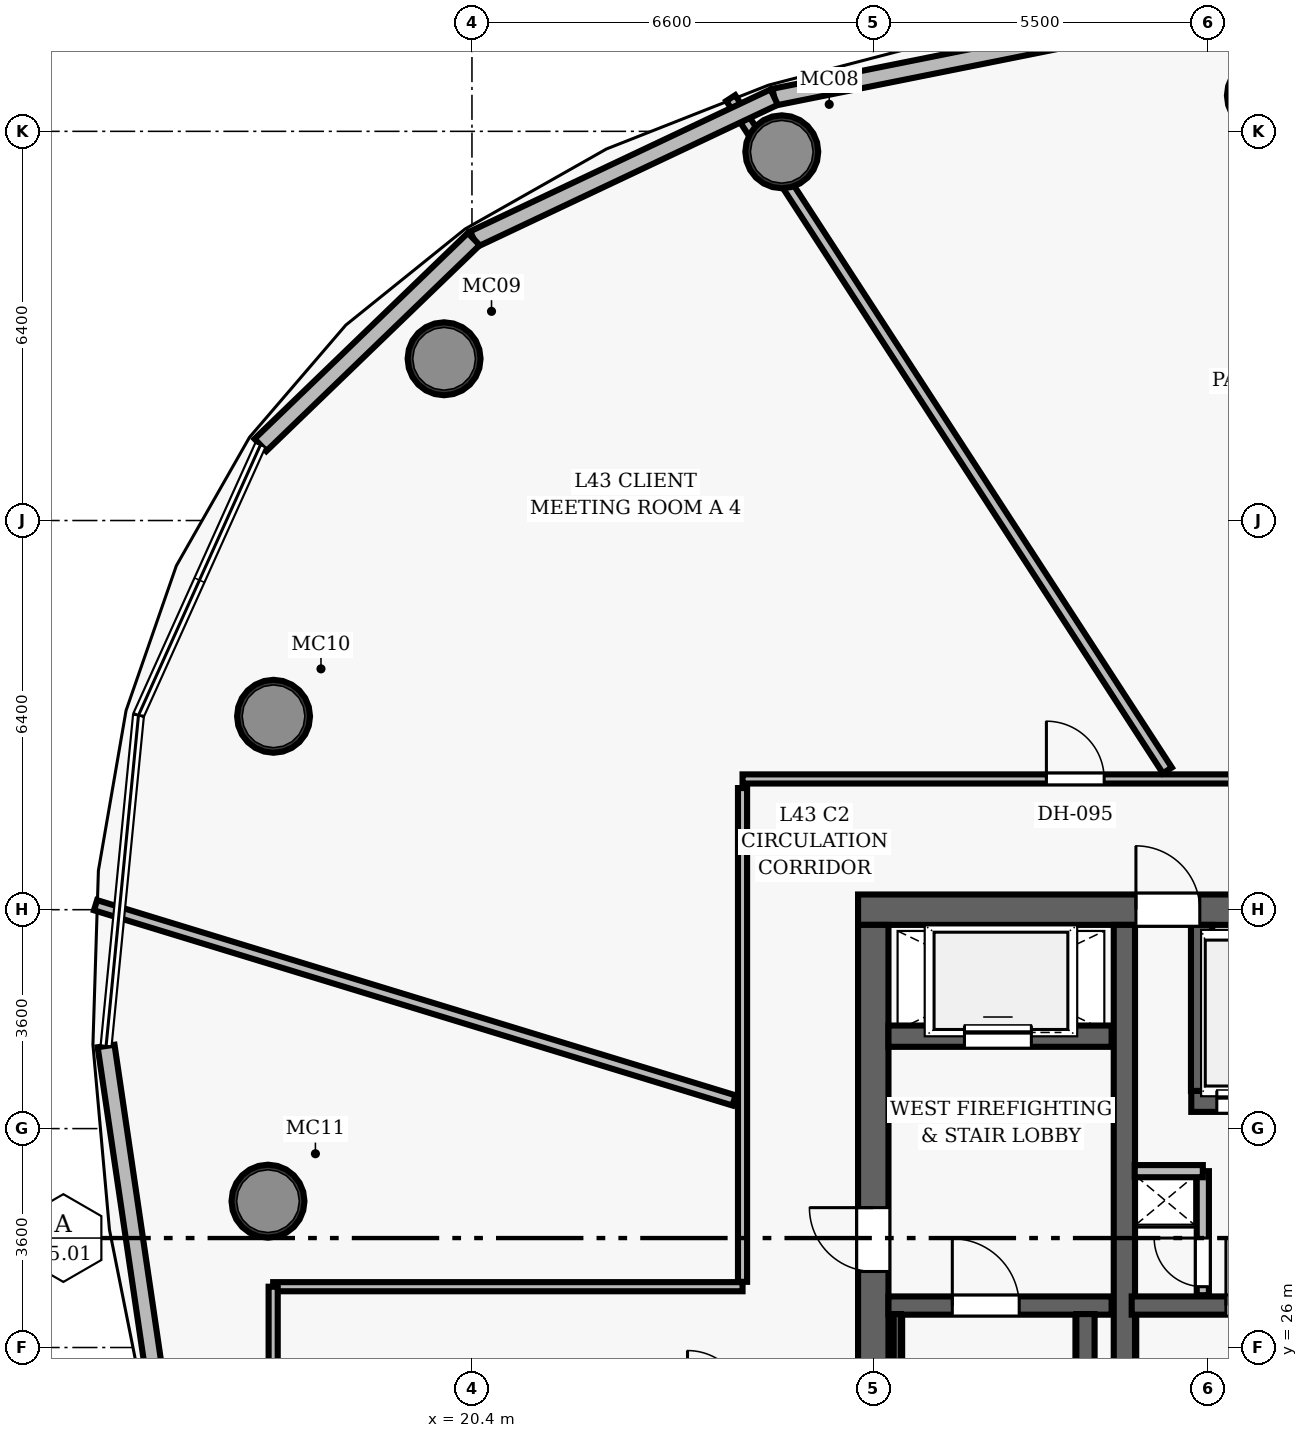
"""IFC4 building model, lengths in metres.
Left out: names, types, materials, properties, quantities, classifications, styles, units other than length and angle.
Written with IfcOpenShell. Run it as: python <this file> out.ifc"""

import sys

from ifc_helpers import new_model, si_unit, direction, frame, frame_2d, origin, origin_2d, place, context, subcontext, project, spatial, rectangle, hollow_circle, extrude, element, fill, save


model = new_model("IFC4")
c1 = context("Model", 3, precision=1e-05, world=origin(), true_north=direction((0.0, 1.0)))
c2 = subcontext(c1, "Body", "Model", "MODEL_VIEW")
j1 = project(units=[si_unit("LENGTHUNIT", "METRE"), si_unit("PLANEANGLEUNIT", "RADIAN")], contexts=[c1])
p1 = place(None, origin())
s1 = spatial("IfcSite", under=j1, at=p1, CompositionType="ELEMENT")
p2 = place(p1, origin())
s2 = spatial("IfcBuilding", under=s1, at=p2, CompositionType="ELEMENT")
p3 = place(p2, frame((0.0, 0.0, 171.2)))
s3 = spatial("IfcBuildingStorey", under=s2, at=p3, CompositionType="ELEMENT", Elevation=171.2)
p4 = place(p3, frame((26.75, 33.2, 0.0), z_axis=(0.0, 0.0, 1.0), x_axis=(1.0, 0.0, 0.0)))
e1 = element("IfcWall", 1, at=p4, inside=s3, PredefinedType="SHEAR", context=c2, shape_type="SweptSolid", body=[
    extrude(rectangle(XDim=22.5, YDim=0.5, at=frame_2d((11.25, 0.0))), origin(), (0.0, 0.0, 1.0), 3.85),
])
p5 = place(p4, frame((4.57, 0.0, 0.0)))
e2 = element("IfcOpeningElement", 2, at=p5, cuts=e1, PredefinedType="OPENING", context=c2, shape_type="SweptSolid", body=[
    extrude(rectangle(XDim=1.05, YDim=2.15, at=frame_2d((0.525, 1.075))), frame((0.0, 0.26, 0.0), z_axis=(0.0, -1.0, 0.0), x_axis=(1.0, 0.0, 0.0)), (0.0, 0.0, 1.0), 0.52),
])
p6 = place(p4, frame((14.47, 0.0, 0.0)))
e3 = element("IfcOpeningElement", 3, at=p6, cuts=e1, PredefinedType="OPENING", context=c2, shape_type="SweptSolid", body=[
    extrude(rectangle(XDim=1.05, YDim=2.15, at=frame_2d((0.525, 1.075))), frame((0.0, 0.26, 0.0), z_axis=(0.0, -1.0, 0.0), x_axis=(1.0, 0.0, 0.0)), (0.0, 0.0, 1.0), 0.52),
])
p7 = place(p3, frame((27.0, 19.05, 0.0), z_axis=(0.0, 0.0, 1.0), x_axis=(0.0, 1.0, 0.0)))
e4 = element("IfcWall", 4, at=p7, inside=s3, PredefinedType="SHEAR", context=c2, shape_type="SweptSolid", body=[
    extrude(rectangle(XDim=13.9, YDim=0.5, at=frame_2d((6.95, 0.0))), origin(), (0.0, 0.0, 1.0), 3.85),
])
p8 = place(p7, frame((8.2, 0.0, 0.0)))
e5 = element("IfcOpeningElement", 5, at=p8, cuts=e4, PredefinedType="OPENING", context=c2, shape_type="SweptSolid", body=[
    extrude(rectangle(XDim=1.05, YDim=2.15, at=frame_2d((0.525, 1.075))), frame((0.0, 0.26, 0.0), z_axis=(0.0, -1.0, 0.0), x_axis=(1.0, 0.0, 0.0)), (0.0, 0.0, 1.0), 0.52),
])
p9 = place(p3, frame((31.13, 19.05, 0.0), z_axis=(0.0, 0.0, 1.0), x_axis=(0.0, 1.0, 0.0)))
e6 = element("IfcWall", 6, at=p9, inside=s3, PredefinedType="SHEAR", context=c2, shape_type="SweptSolid", body=[
    extrude(rectangle(XDim=13.9, YDim=0.35, at=frame_2d((6.95, 0.0))), origin(), (0.0, 0.0, 1.0), 3.85),
])
for number, where, z_axis, x_axis in (
    (7, (33.416, 46.588, 0.0), (0.0, 0.0, 1.0), (1.0, 0.0, 0.0)),
    (8, (25.496, 45.664, 0.0), (0.0, 0.0, 1.0), (1.0, 0.0, 0.0)),
    (9, (19.942, 42.26, 0.0), (0.0, 0.0, 1.0), (1.0, 0.0, 0.0)),
    (10, (17.137, 36.381, 0.0), (0.0, 0.0, 1.0), (1.0, 0.0, 0.0)),
    (11, (17.045, 28.406, 0.0), (0.0, 0.0, 1.0), (1.0, 0.0, 0.0)),
):
    element("IfcColumn", number, at=place(p3, frame(where, z_axis=z_axis, x_axis=x_axis)), inside=s3, PredefinedType="COLUMN", context=c2, shape_type="SweptSolid", body=[
        extrude(hollow_circle(Radius=0.6, WallThickness=0.05, at=origin_2d()), origin(), (0.0, 0.0, 1.0), 3.85),
    ])
p10 = place(p3, frame((27.25, 26.69, 0.0), z_axis=(0.0, 0.0, 1.0), x_axis=(1.0, 0.0, 0.0)))
e12 = element("IfcWall", 12, at=p10, inside=s3, PredefinedType="SHEAR", context=c2, shape_type="SweptSolid", body=[
    extrude(rectangle(XDim=3.67, YDim=0.3, at=frame_2d((1.835, 0.0))), origin(), (0.0, 0.0, 1.0), 3.85),
])
p11 = place(p10, frame((1.05, 0.0, 0.0)))
e13 = element("IfcOpeningElement", 13, at=p11, cuts=e12, PredefinedType="OPENING", context=c2, shape_type="SweptSolid", body=[
    extrude(rectangle(XDim=1.1, YDim=2.15, at=frame_2d((0.55, 1.075))), frame((0.0, 0.16, 0.0), z_axis=(0.0, -1.0, 0.0), x_axis=(1.0, 0.0, 0.0)), (0.0, 0.0, 1.0), 0.32),
])
p12 = place(p3, frame((30.49, 19.05, 0.0), z_axis=(0.0, 0.0, 1.0), x_axis=(0.0, 1.0, 0.0)))
e14 = element("IfcWall", 14, at=p12, inside=s3, PredefinedType="SHEAR", context=c2, shape_type="SweptSolid", body=[
    extrude(rectangle(XDim=7.5, YDim=0.3, at=frame_2d((3.75, 0.0))), origin(), (0.0, 0.0, 1.0), 3.85),
])
p13 = place(p3, frame((27.395, 19.1, 0.0), z_axis=(0.0, 0.0, 1.0), x_axis=(0.0, 1.0, 0.0)))
e15 = element("IfcWall", 15, at=p13, inside=s3, PredefinedType="SHEAR", context=c2, shape_type="SweptSolid", body=[
    extrude(rectangle(XDim=7.45, YDim=0.12, at=frame_2d((3.725, 0.0))), origin(), (0.0, 0.0, 1.0), 3.85),
])
p14 = place(p3, frame((27.25, 31.12, 0.0), z_axis=(0.0, 0.0, 1.0), x_axis=(1.0, 0.0, 0.0)))
e16 = element("IfcWall", 16, at=p14, inside=s3, PredefinedType="SHEAR", context=c2, shape_type="SweptSolid", body=[
    extrude(rectangle(XDim=3.67, YDim=0.35, at=frame_2d((1.835, 0.0))), origin(), (0.0, 0.0, 1.0), 3.035),
])
p15 = place(p14, frame((1.25, 0.0, 0.0)))
e17 = element("IfcOpeningElement", 17, at=p15, cuts=e16, PredefinedType="OPENING", context=c2, shape_type="SweptSolid", body=[
    extrude(rectangle(XDim=1.1, YDim=2.15, at=frame_2d((0.55, 1.075))), frame((0.0, 0.185, 0.0), z_axis=(0.0, -1.0, 0.0), x_axis=(1.0, 0.0, 0.0)), (0.0, 0.0, 1.0), 0.37),
])
p16 = place(p3, frame((31.25, 26.69, 0.0), z_axis=(0.0, 0.0, 1.0), x_axis=(1.0, 0.0, 0.0)))
e18 = element("IfcWall", 18, at=p16, inside=s3, PredefinedType="SHEAR", context=c2, shape_type="SweptSolid", body=[
    extrude(rectangle(XDim=3.56, YDim=0.3, at=frame_2d((1.78, 0.0))), origin(), (0.0, 0.0, 1.0), 3.85),
])
p17 = place(p16, frame((1.55, 0.0, 0.0)))
e19 = element("IfcOpeningElement", 19, at=p17, cuts=e18, PredefinedType="OPENING", context=c2, shape_type="SweptSolid", body=[
    extrude(rectangle(XDim=1.1, YDim=2.15, at=frame_2d((0.55, 1.075))), frame((0.0, 0.16, 0.0), z_axis=(0.0, -1.0, 0.0), x_axis=(1.0, 0.0, 0.0)), (0.0, 0.0, 1.0), 0.32),
])
p18 = place(p3, frame((32.23, 30.05, 0.0), z_axis=(0.0, 0.0, 1.0), x_axis=(1.0, 0.0, 0.0)))
e20 = element("IfcWall", 20, at=p18, inside=s3, PredefinedType="SHEAR", context=c2, shape_type="SweptSolid", body=[
    extrude(rectangle(XDim=2.41, YDim=0.35, at=frame_2d((1.205, 0.0))), origin(), (0.0, 0.0, 1.0), 3.035),
])
p19 = place(p18, frame((0.42, 0.0, 0.0)))
e21 = element("IfcOpeningElement", 21, at=p19, cuts=e20, PredefinedType="OPENING", context=c2, shape_type="SweptSolid", body=[
    extrude(rectangle(XDim=0.8, YDim=2.15, at=frame_2d((0.4, 1.075))), frame((0.0, 0.185, 0.0), z_axis=(0.0, -1.0, 0.0), x_axis=(1.0, 0.0, 0.0)), (0.0, 0.0, 1.0), 0.37),
])
p20 = place(p18, frame((1.42, 0.0, 0.0)))
e22 = element("IfcOpeningElement", 22, at=p20, cuts=e20, PredefinedType="OPENING", context=c2, shape_type="SweptSolid", body=[
    extrude(rectangle(XDim=0.8, YDim=2.15, at=frame_2d((0.4, 1.075))), frame((0.0, 0.185, 0.0), z_axis=(0.0, -1.0, 0.0), x_axis=(1.0, 0.0, 0.0)), (0.0, 0.0, 1.0), 0.37),
])
p21 = place(p3, frame((32.4, 30.22, 0.0), z_axis=(0.0, 0.0, 1.0), x_axis=(0.0, 1.0, 0.0)))
e23 = element("IfcWall", 23, at=p21, inside=s3, PredefinedType="SHEAR", context=c2, shape_type="SweptSolid", body=[
    extrude(rectangle(XDim=2.73, YDim=0.35, at=frame_2d((1.365, 0.0))), origin(), (0.0, 0.0, 1.0), 3.035),
])
p22 = place(p3, frame((32.42, 26.86, 0.0), z_axis=(0.0, 0.0, 1.0), x_axis=(0.0, 1.0, 0.0)))
e24 = element("IfcWall", 24, at=p22, inside=s3, PredefinedType="PARTITIONING", context=c2, shape_type="SweptSolid", body=[
    extrude(rectangle(XDim=2.04, YDim=0.2, at=frame_2d((1.02, 0.0))), origin(), (0.0, 0.0, 1.0), 3.035),
])
p23 = place(p22, frame((0.14, 0.0, 0.0)))
e25 = element("IfcOpeningElement", 25, at=p23, cuts=e24, PredefinedType="OPENING", context=c2, shape_type="SweptSolid", body=[
    extrude(rectangle(XDim=0.8, YDim=2.05, at=frame_2d((0.4, 1.025))), frame((0.0, 0.11, 0.0), z_axis=(0.0, -1.0, 0.0), x_axis=(1.0, 0.0, 0.0)), (0.0, 0.0, 1.0), 0.22),
])
p24 = place(p3, frame((31.3, 28.9, 0.0), z_axis=(0.0, 0.0, 1.0), x_axis=(1.0, 0.0, 0.0)))
e26 = element("IfcWall", 26, at=p24, inside=s3, PredefinedType="PARTITIONING", context=c2, shape_type="SweptSolid", body=[
    extrude(rectangle(XDim=1.12, YDim=0.2, at=frame_2d((0.56, 0.0))), origin(), (0.0, 0.0, 1.0), 3.035),
])
p25 = place(p3, frame((24.85, 35.35, 0.0), z_axis=(0.0, 0.0, 1.0), x_axis=(1.0, 0.0, 0.0)))
e27 = element("IfcWall", 27, at=p25, inside=s3, PredefinedType="PARTITIONING", context=c2, shape_type="SweptSolid", body=[
    extrude(rectangle(XDim=26.0, YDim=0.15, at=frame_2d((13.0, 0.0))), origin(), (0.0, 0.0, 1.0), 3.035),
])
p26 = place(p25, frame((15.674, 0.0, 0.0)))
e28 = element("IfcOpeningElement", 28, at=p26, cuts=e27, PredefinedType="OPENING", context=c2, shape_type="SweptSolid", body=[
    extrude(rectangle(XDim=1.5, YDim=2.2, at=frame_2d((0.75, 1.1))), frame((0.0, 0.085, 0.0), z_axis=(0.0, -1.0, 0.0), x_axis=(1.0, 0.0, 0.0)), (0.0, 0.0, 1.0), 0.17),
])
p27 = place(p25, frame((10.178, 0.0, 0.0)))
e29 = element("IfcOpeningElement", 29, at=p27, cuts=e27, PredefinedType="OPENING", context=c2, shape_type="SweptSolid", body=[
    extrude(rectangle(XDim=0.95, YDim=2.15, at=frame_2d((0.475, 1.075))), frame((0.0, 0.085, 0.0), z_axis=(0.0, -1.0, 0.0), x_axis=(1.0, 0.0, 0.0)), (0.0, 0.0, 1.0), 0.17),
])
p28 = place(p25, frame((4.997, 0.0, 0.0)))
e30 = element("IfcOpeningElement", 30, at=p28, cuts=e27, PredefinedType="OPENING", context=c2, shape_type="SweptSolid", body=[
    extrude(rectangle(XDim=0.95, YDim=2.15, at=frame_2d((0.475, 1.075))), frame((0.0, 0.085, 0.0), z_axis=(0.0, -1.0, 0.0), x_axis=(1.0, 0.0, 0.0)), (0.0, 0.0, 1.0), 0.17),
])
p29 = place(p3, frame((24.85, 27.08, 0.0), z_axis=(0.0, 0.0, 1.0), x_axis=(0.0, 1.0, 0.0)))
e31 = element("IfcWall", 31, at=p29, inside=s3, PredefinedType="PARTITIONING", context=c2, shape_type="SweptSolid", body=[
    extrude(rectangle(XDim=8.12, YDim=0.15, at=frame_2d((4.06, 0.0))), origin(), (0.0, 0.0, 1.0), 3.035),
])
p30 = place(p3, frame((17.131, 27.0, 0.0), z_axis=(0.0, 0.0, 1.0), x_axis=(1.0, 0.0, 0.0)))
e32 = element("IfcWall", 32, at=p30, inside=s3, PredefinedType="PARTITIONING", context=c2, shape_type="SweptSolid", body=[
    extrude(rectangle(XDim=7.719, YDim=0.15, at=frame_2d((3.86, 0.0))), origin(), (0.0, 0.0, 1.0), 3.035),
])
p31 = place(p3, frame((17.131, 25.0, 0.0), z_axis=(0.0, 0.0, 1.0), x_axis=(0.0, 1.0, 0.0)))
e33 = element("IfcWall", 33, at=p31, inside=s3, PredefinedType="PARTITIONING", context=c2, shape_type="SweptSolid", body=[
    extrude(rectangle(XDim=2.0, YDim=0.15, at=frame_2d((1.0, 0.0))), origin(), (0.0, 0.0, 1.0), 3.035),
])
p32 = place(p3, frame((31.837, 35.49, 0.0), z_axis=(0.0, 0.0, 1.0), x_axis=(-0.544634876215, 0.838673268687, 0.0)))
e34 = element("IfcWall", 34, at=p32, inside=s3, PredefinedType="PARTITIONING", context=c2, shape_type="SweptSolid", body=[
    extrude(rectangle(XDim=13.184, YDim=0.175, at=frame_2d((6.592, 0.0))), origin(), (0.0, 0.0, 1.0), 3.035),
])
p33 = place(p3, frame((24.71, 30.063, 0.0), z_axis=(0.0, 0.0, 1.0), x_axis=(-0.956305303445, 0.292369913984, 0.0)))
e35 = element("IfcWall", 35, at=p33, inside=s3, PredefinedType="PARTITIONING", context=c2, shape_type="SweptSolid", body=[
    extrude(rectangle(XDim=10.981, YDim=0.175, at=frame_2d((5.49, 0.0))), origin(), (0.0, 0.0, 1.0), 3.035),
])
p34 = place(p3, frame((25.37, 46.563, 0.0), z_axis=(0.0, 0.0, 1.0), x_axis=(0.980506708693, 0.196485608144, 0.0)))
e36 = element("IfcWall", 36, at=p34, inside=s3, PredefinedType="SOLIDWALL", context=c2, shape_type="SweptSolid", body=[
    extrude(rectangle(XDim=6.226, YDim=0.28, at=frame_2d((3.113, 0.0))), origin(), (0.0, 0.0, 1.0), 3.62),
])
p35 = place(p3, frame((20.43, 44.229, 0.0), z_axis=(0.0, 0.0, 1.0), x_axis=(0.904134088176, 0.427248815794, 0.0)))
e37 = element("IfcWall", 37, at=p35, inside=s3, PredefinedType="SOLIDWALL", context=c2, shape_type="SweptSolid", body=[
    extrude(rectangle(XDim=5.465, YDim=0.28, at=frame_2d((2.732, 0.0))), origin(), (0.0, 0.0, 1.0), 3.62),
])
p36 = place(p3, frame((16.921, 40.842, 0.0), z_axis=(0.0, 0.0, 1.0), x_axis=(0.719536884829, 0.69445422554, 0.0)))
e38 = element("IfcWall", 38, at=p36, inside=s3, PredefinedType="SOLIDWALL", context=c2, shape_type="SweptSolid", body=[
    extrude(rectangle(XDim=4.876, YDim=0.28, at=frame_2d((2.438, 0.0))), origin(), (0.0, 0.0, 1.0), 3.62),
])
p37 = place(p3, frame((15.289, 24.799, 0.0), z_axis=(0.0, 0.0, 1.0), x_axis=(-0.145586553234, 0.989345518774, 0.0)))
e39 = element("IfcWall", 39, at=p37, inside=s3, PredefinedType="SOLIDWALL", context=c2, shape_type="SweptSolid", body=[
    extrude(rectangle(XDim=6.227, YDim=0.28, at=frame_2d((3.113, 0.0))), origin(), (0.0, 0.0, 1.0), 3.62),
])
p38 = place(p11, origin())
e40 = element("IfcDoor", 40, at=p38, inside=s3, OperationType="SINGLE_SWING_LEFT", PredefinedType="DOOR", context=c2, shape_type="SweptSolid", body=[
    extrude(rectangle(XDim=1.1, YDim=2.15, at=frame_2d((0.55, 1.075))), frame((0.0, 0.025, 0.0), z_axis=(0.0, -1.0, 0.0), x_axis=(1.0, 0.0, 0.0)), (0.0, 0.0, 1.0), 0.05),
])
fill(e13, e40)
p39 = place(p8, origin())
e41 = element("IfcDoor", 41, at=p39, inside=s3, OperationType="SINGLE_SWING_RIGHT", PredefinedType="DOOR", context=c2, shape_type="SweptSolid", body=[
    extrude(rectangle(XDim=1.05, YDim=2.15, at=frame_2d((0.525, 1.075))), frame((0.0, 0.025, 0.0), z_axis=(0.0, -1.0, 0.0), x_axis=(1.0, 0.0, 0.0)), (0.0, 0.0, 1.0), 0.05),
])
fill(e5, e41)
p40 = place(p17, origin())
e42 = element("IfcDoor", 42, at=p40, inside=s3, OperationType="SINGLE_SWING_LEFT", PredefinedType="DOOR", context=c2, shape_type="SweptSolid", body=[
    extrude(rectangle(XDim=1.1, YDim=2.15, at=frame_2d((0.55, 1.075))), frame((0.0, 0.025, 0.0), z_axis=(0.0, -1.0, 0.0), x_axis=(1.0, 0.0, 0.0)), (0.0, 0.0, 1.0), 0.05),
])
fill(e19, e42)
p41 = place(p23, origin())
e43 = element("IfcDoor", 43, at=p41, inside=s3, OperationType="SINGLE_SWING_RIGHT", PredefinedType="DOOR", context=c2, shape_type="SweptSolid", body=[
    extrude(rectangle(XDim=0.8, YDim=2.05, at=frame_2d((0.4, 1.025))), frame((0.0, 0.025, 0.0), z_axis=(0.0, -1.0, 0.0), x_axis=(1.0, 0.0, 0.0)), (0.0, 0.0, 1.0), 0.05),
])
fill(e25, e43)
p42 = place(p5, origin())
e44 = element("IfcDoor", 44, at=p42, inside=s3, OperationType="SINGLE_SWING_LEFT", PredefinedType="DOOR", context=c2, shape_type="SweptSolid", body=[
    extrude(rectangle(XDim=1.05, YDim=2.15, at=frame_2d((0.525, 1.075))), frame((0.0, 0.025, 0.0), z_axis=(0.0, -1.0, 0.0), x_axis=(1.0, 0.0, 0.0)), (0.0, 0.0, 1.0), 0.05),
])
fill(e2, e44)
p43 = place(p28, origin())
e45 = element("IfcDoor", 45, at=p43, inside=s3, OperationType="SINGLE_SWING_LEFT", PredefinedType="DOOR", context=c2, shape_type="SweptSolid", body=[
    extrude(rectangle(XDim=0.95, YDim=2.15, at=frame_2d((0.475, 1.075))), frame((0.0, 0.025, 0.0), z_axis=(0.0, -1.0, 0.0), x_axis=(1.0, 0.0, 0.0)), (0.0, 0.0, 1.0), 0.05),
])
fill(e30, e45)
p44 = place(p15, origin())
e46 = element("IfcDoor", 46, at=p44, inside=s3, OperationType="SLIDING_TO_LEFT", PredefinedType="DOOR", context=c2, shape_type="SweptSolid", body=[
    extrude(rectangle(XDim=1.1, YDim=2.15, at=frame_2d((0.55, 1.075))), frame((0.0, 0.025, 0.0), z_axis=(0.0, -1.0, 0.0), x_axis=(1.0, 0.0, 0.0)), (0.0, 0.0, 1.0), 0.05),
])
fill(e17, e46)
p45 = place(p19, origin())
e47 = element("IfcDoor", 47, at=p45, inside=s3, OperationType="SLIDING_TO_LEFT", PredefinedType="DOOR", context=c2, shape_type="SweptSolid", body=[
    extrude(rectangle(XDim=0.8, YDim=2.15, at=frame_2d((0.4, 1.075))), frame((0.0, 0.025, 0.0), z_axis=(0.0, -1.0, 0.0), x_axis=(1.0, 0.0, 0.0)), (0.0, 0.0, 1.0), 0.05),
])
fill(e21, e47)
save(model, sys.argv[1])
